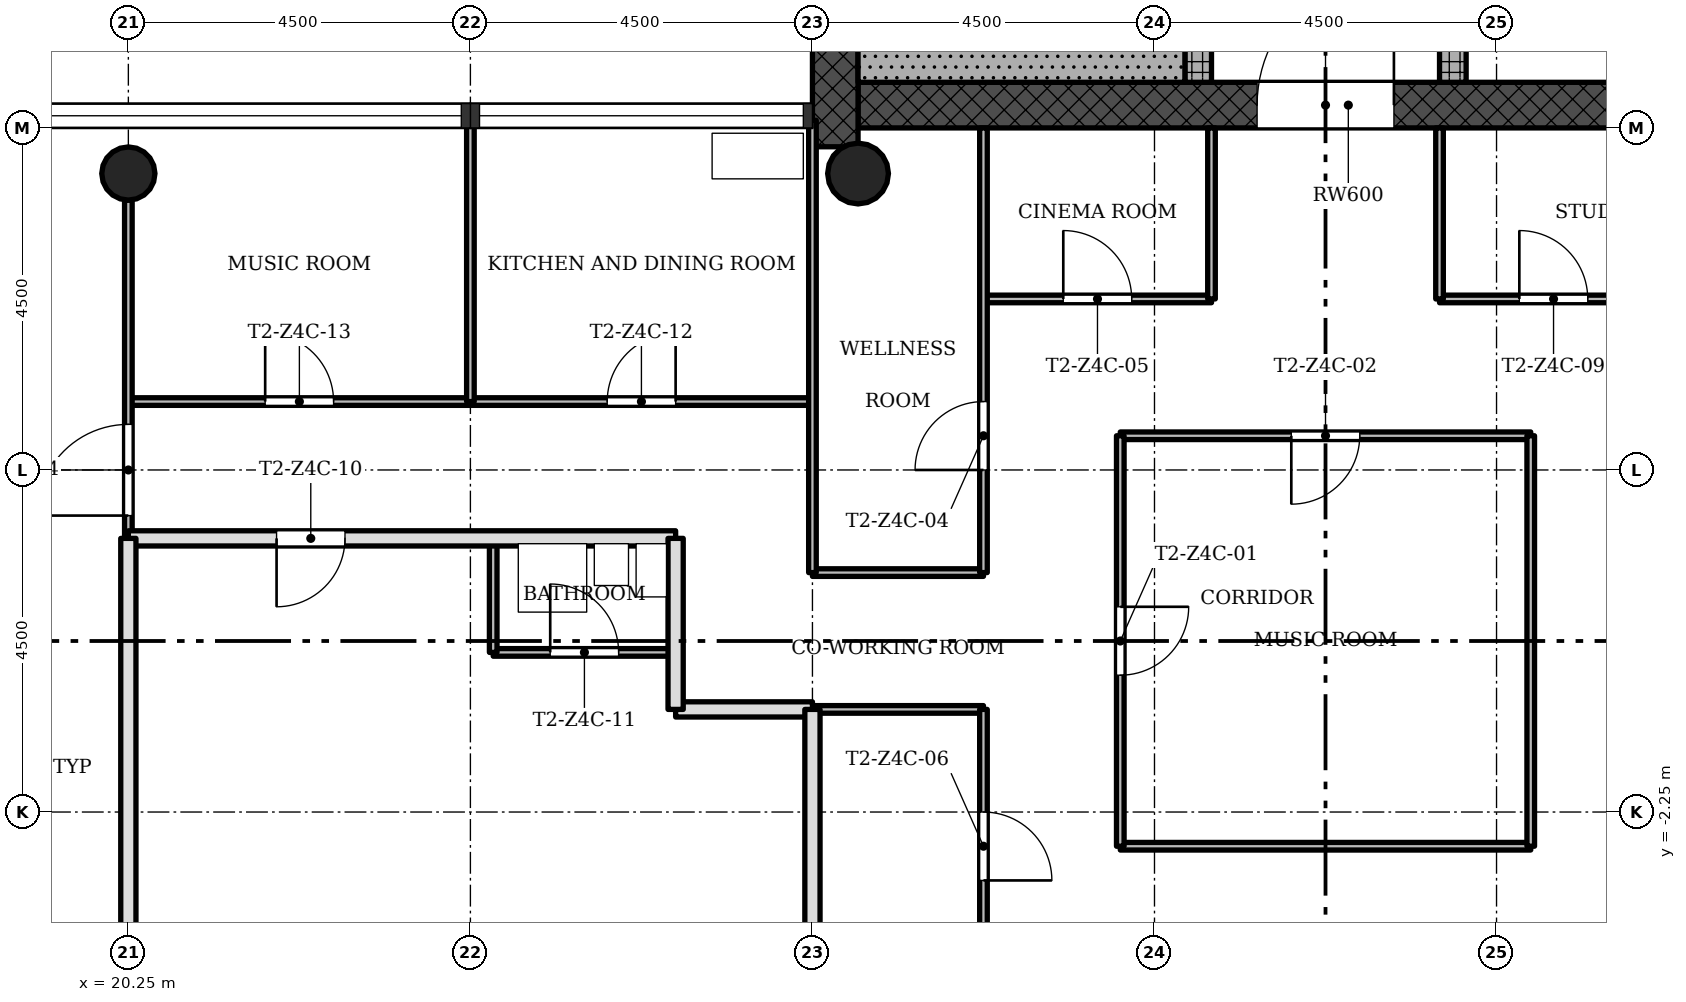
"""IFC4 building model, lengths in metres.
Left out: names, types, materials, properties, quantities, classifications, styles, units other than length and angle.
Written with IfcOpenShell. Run it as: python <this file> out.ifc"""

import sys

from ifc_helpers import new_model, si_unit, direction, frame, frame_2d, origin, origin_2d, place, context, subcontext, project, spatial, rectangle, hollow_circle, extrude, element, fill, save


model = new_model("IFC4")
c1 = context("Model", 3, precision=1e-05, world=origin(), true_north=direction((0.0, 1.0)))
c2 = subcontext(c1, "Body", "Model", "MODEL_VIEW")
j1 = project(units=[si_unit("LENGTHUNIT", "METRE"), si_unit("PLANEANGLEUNIT", "RADIAN")], contexts=[c1])
p1 = place(None, origin())
s1 = spatial("IfcSite", under=j1, at=p1, CompositionType="ELEMENT")
p2 = place(p1, origin())
s2 = spatial("IfcBuilding", under=s1, at=p2, CompositionType="ELEMENT")
p3 = place(p2, frame((0.0, 0.0, 189.2)))
s3 = spatial("IfcBuildingStorey", under=s2, at=p3, CompositionType="ELEMENT", Elevation=189.2)
p4 = place(p3, frame((29.85, 7.05, 0.0), z_axis=(0.0, 0.0, 1.0), x_axis=(1.0, 0.0, 0.0)))
e1 = element("IfcWall", 1, at=p4, inside=s3, PredefinedType="SHEAR", context=c2, shape_type="SweptSolid", body=[
    extrude(rectangle(XDim=12.9, YDim=0.6, at=frame_2d((6.45, 0.0))), origin(), (0.0, 0.0, 1.0), 3.4),
])
p5 = place(p4, frame((5.25, 0.0, 0.0)))
e2 = element("IfcOpeningElement", 2, at=p5, cuts=e1, PredefinedType="OPENING", context=c2, shape_type="SweptSolid", body=[
    extrude(rectangle(XDim=1.8, YDim=2.1, at=frame_2d((0.9, 1.05))), frame((0.0, 0.31, 0.0), z_axis=(0.0, -1.0, 0.0), x_axis=(1.0, 0.0, 0.0)), (0.0, 0.0, 1.0), 0.62),
])
p6 = place(p3, frame((29.55, 15.15, 0.0), z_axis=(0.0, 0.0, 1.0), x_axis=(0.0, -1.0, 0.0)))
e3 = element("IfcWall", 3, at=p6, inside=s3, PredefinedType="SHEAR", context=c2, shape_type="SweptSolid", body=[
    extrude(rectangle(XDim=8.648, YDim=0.6, at=frame_2d((4.324, 0.0))), origin(), (0.0, 0.0, 1.0), 3.4),
])
p7 = place(p3, frame((34.325, 7.35, 0.0), z_axis=(0.0, 0.0, 1.0), x_axis=(0.0, 1.0, 0.0)))
e4 = element("IfcWall", 4, at=p7, inside=s3, PredefinedType="SHEAR", context=c2, shape_type="SweptSolid", body=[
    extrude(rectangle(XDim=7.8, YDim=0.35, at=frame_2d((3.9, 0.0))), origin(), (0.0, 0.0, 1.0), 3.4),
])
p8 = place(p7, frame((1.05, 0.0, 0.0)))
e5 = element("IfcOpeningElement", 5, at=p8, cuts=e4, PredefinedType="OPENING", context=c2, shape_type="SweptSolid", body=[
    extrude(rectangle(XDim=0.9, YDim=2.1, at=frame_2d((0.45, 1.05))), frame((0.0, 0.185, 0.0), z_axis=(0.0, -1.0, 0.0), x_axis=(1.0, 0.0, 0.0)), (0.0, 0.0, 1.0), 0.37),
])
p9 = place(p3, frame((37.675, 7.35, 0.0), z_axis=(0.0, 0.0, 1.0), x_axis=(0.0, 1.0, 0.0)))
e6 = element("IfcWall", 6, at=p9, inside=s3, PredefinedType="SHEAR", context=c2, shape_type="SweptSolid", body=[
    extrude(rectangle(XDim=7.8, YDim=0.35, at=frame_2d((3.9, 0.0))), origin(), (0.0, 0.0, 1.0), 3.4),
])
p10 = place(p9, frame((1.15, 0.0, 0.0)))
e7 = element("IfcOpeningElement", 7, at=p10, cuts=e6, PredefinedType="OPENING", context=c2, shape_type="SweptSolid", body=[
    extrude(rectangle(XDim=1.1, YDim=2.1, at=frame_2d((0.55, 1.05))), frame((0.0, 0.185, 0.0), z_axis=(0.0, -1.0, 0.0), x_axis=(1.0, 0.0, 0.0)), (0.0, 0.0, 1.0), 0.37),
])
p11 = place(p9, frame((3.35, 0.0, 0.0)))
e8 = element("IfcOpeningElement", 8, at=p11, cuts=e6, PredefinedType="OPENING", context=c2, shape_type="SweptSolid", body=[
    extrude(rectangle(XDim=1.1, YDim=2.1, at=frame_2d((0.55, 1.05))), frame((0.0, 0.185, 0.0), z_axis=(0.0, -1.0, 0.0), x_axis=(1.0, 0.0, 0.0)), (0.0, 0.0, 1.0), 0.37),
])
p12 = place(p9, frame((5.55, 0.0, 0.0)))
e9 = element("IfcOpeningElement", 9, at=p12, cuts=e6, PredefinedType="OPENING", context=c2, shape_type="SweptSolid", body=[
    extrude(rectangle(XDim=1.1, YDim=2.1, at=frame_2d((0.55, 1.05))), frame((0.0, 0.185, 0.0), z_axis=(0.0, -1.0, 0.0), x_axis=(1.0, 0.0, 0.0)), (0.0, 0.0, 1.0), 0.37),
])
p13 = place(p3, frame((20.25, 6.15, 0.0), z_axis=(0.0, 0.0, 1.0), x_axis=(1.0, 0.0, 0.0)))
e10 = element("IfcColumn", 10, at=p13, inside=s3, PredefinedType="COLUMN", context=c2, shape_type="SweptSolid", body=[
    extrude(hollow_circle(Radius=0.35, WallThickness=0.025, at=origin_2d()), origin(), (0.0, 0.0, 1.0), 3.4),
])
p14 = place(p3, frame((29.85, 6.15, 0.0), z_axis=(0.0, 0.0, 1.0), x_axis=(1.0, 0.0, 0.0)))
e11 = element("IfcColumn", 11, at=p14, inside=s3, PredefinedType="COLUMN", context=c2, shape_type="SweptSolid", body=[
    extrude(hollow_circle(Radius=0.4, WallThickness=0.028, at=origin_2d()), origin(), (0.0, 0.0, 1.0), 3.4),
])
p15 = place(p3, frame((38.7, -2.7, 0.0), z_axis=(0.0, 0.0, 1.0), x_axis=(-1.0, 0.0, 0.0)))
e12 = element("IfcWall", 12, at=p15, inside=s3, PredefinedType="PARTITIONING", context=c2, shape_type="SweptSolid", body=[
    extrude(rectangle(XDim=5.4, YDim=0.1, at=frame_2d((2.7, 0.0))), origin(), (0.0, 0.0, 1.0), 3.0),
])
p16 = place(p3, frame((31.5, -0.9, 0.0), z_axis=(0.0, 0.0, 1.0), x_axis=(-1.0, 0.0, 0.0)))
e13 = element("IfcWall", 13, at=p16, inside=s3, PredefinedType="PARTITIONING", context=c2, shape_type="SweptSolid", body=[
    extrude(rectangle(XDim=2.25, YDim=0.1, at=frame_2d((1.125, 0.0))), origin(), (0.0, 0.0, 1.0), 3.0),
])
p17 = place(p3, frame((29.25, -0.9, 0.0), z_axis=(0.0, 0.0, 1.0), x_axis=(-1.0, 0.0, 0.0)))
e14 = element("IfcWall", 14, at=p17, inside=s3, PredefinedType="SOLIDWALL", context=c2, shape_type="SweptSolid", body=[
    extrude(rectangle(XDim=1.8, YDim=0.2, at=frame_2d((0.9, 0.0))), origin(), (0.0, 0.0, 1.0), 3.0),
])
p18 = place(p3, frame((27.45, -0.15, 0.0), z_axis=(0.0, 0.0, 1.0), x_axis=(-1.0, 0.0, 0.0)))
e15 = element("IfcWall", 15, at=p18, inside=s3, PredefinedType="PARTITIONING", context=c2, shape_type="SweptSolid", body=[
    extrude(rectangle(XDim=2.4, YDim=0.1, at=frame_2d((1.2, 0.0))), origin(), (0.0, 0.0, 1.0), 3.0),
])
p19 = place(p18, frame((0.75, 0.0, 0.0)))
e16 = element("IfcOpeningElement", 16, at=p19, cuts=e15, PredefinedType="OPENING", context=c2, shape_type="SweptSolid", body=[
    extrude(rectangle(XDim=0.9, YDim=2.1, at=frame_2d((0.45, 1.05))), frame((0.0, 0.06, 0.0), z_axis=(0.0, -1.0, 0.0), x_axis=(1.0, 0.0, 0.0)), (0.0, 0.0, 1.0), 0.12),
])
p20 = place(p3, frame((31.5, 0.9, 0.0), z_axis=(0.0, 0.0, 1.0), x_axis=(-1.0, 0.0, 0.0)))
e17 = element("IfcWall", 17, at=p20, inside=s3, PredefinedType="PARTITIONING", context=c2, shape_type="SweptSolid", body=[
    extrude(rectangle(XDim=2.25, YDim=0.1, at=frame_2d((1.125, 0.0))), origin(), (0.0, 0.0, 1.0), 3.0),
])
p21 = place(p3, frame((27.45, 1.35, 0.0), z_axis=(0.0, 0.0, 1.0), x_axis=(-1.0, 0.0, 0.0)))
e18 = element("IfcWall", 18, at=p21, inside=s3, PredefinedType="SOLIDWALL", context=c2, shape_type="SweptSolid", body=[
    extrude(rectangle(XDim=7.2, YDim=0.2, at=frame_2d((3.6, 0.0))), origin(), (0.0, 0.0, 1.0), 3.0),
])
p22 = place(p21, frame((4.35, 0.0, 0.0)))
e19 = element("IfcOpeningElement", 19, at=p22, cuts=e18, PredefinedType="OPENING", context=c2, shape_type="SweptSolid", body=[
    extrude(rectangle(XDim=0.9, YDim=2.1, at=frame_2d((0.45, 1.05))), frame((0.0, 0.11, 0.0), z_axis=(0.0, -1.0, 0.0), x_axis=(1.0, 0.0, 0.0)), (0.0, 0.0, 1.0), 0.22),
])
p23 = place(p3, frame((38.7, 2.7, 0.0), z_axis=(0.0, 0.0, 1.0), x_axis=(-1.0, 0.0, 0.0)))
e20 = element("IfcWall", 20, at=p23, inside=s3, PredefinedType="PARTITIONING", context=c2, shape_type="SweptSolid", body=[
    extrude(rectangle(XDim=5.4, YDim=0.1, at=frame_2d((2.7, 0.0))), origin(), (0.0, 0.0, 1.0), 3.0),
])
p24 = place(p23, frame((2.25, 0.0, 0.0)))
e21 = element("IfcOpeningElement", 21, at=p24, cuts=e20, PredefinedType="OPENING", context=c2, shape_type="SweptSolid", body=[
    extrude(rectangle(XDim=0.9, YDim=2.1, at=frame_2d((0.45, 1.05))), frame((0.0, 0.06, 0.0), z_axis=(0.0, -1.0, 0.0), x_axis=(1.0, 0.0, 0.0)), (0.0, 0.0, 1.0), 0.12),
])
p25 = place(p3, frame((29.25, 3.15, 0.0), z_axis=(0.0, 0.0, 1.0), x_axis=(-1.0, 0.0, 0.0)))
e22 = element("IfcWall", 22, at=p25, inside=s3, PredefinedType="PARTITIONING", context=c2, shape_type="SweptSolid", body=[
    extrude(rectangle(XDim=9.0, YDim=0.1, at=frame_2d((4.5, 0.0))), origin(), (0.0, 0.0, 1.0), 3.0),
])
p26 = place(p25, frame((1.8, 0.0, 0.0)))
e23 = element("IfcOpeningElement", 23, at=p26, cuts=e22, PredefinedType="OPENING", context=c2, shape_type="SweptSolid", body=[
    extrude(rectangle(XDim=0.9, YDim=2.1, at=frame_2d((0.45, 1.05))), frame((0.0, 0.06, 0.0), z_axis=(0.0, -1.0, 0.0), x_axis=(1.0, 0.0, 0.0)), (0.0, 0.0, 1.0), 0.12),
])
p27 = place(p25, frame((6.3, 0.0, 0.0)))
e24 = element("IfcOpeningElement", 24, at=p27, cuts=e22, PredefinedType="OPENING", context=c2, shape_type="SweptSolid", body=[
    extrude(rectangle(XDim=0.9, YDim=2.1, at=frame_2d((0.45, 1.05))), frame((0.0, 0.06, 0.0), z_axis=(0.0, -1.0, 0.0), x_axis=(1.0, 0.0, 0.0)), (0.0, 0.0, 1.0), 0.12),
])
p28 = place(p3, frame((42.75, 4.5, 0.0), z_axis=(0.0, 0.0, 1.0), x_axis=(-1.0, 0.0, 0.0)))
e25 = element("IfcWall", 25, at=p28, inside=s3, PredefinedType="PARTITIONING", context=c2, shape_type="SweptSolid", body=[
    extrude(rectangle(XDim=5.25, YDim=0.1, at=frame_2d((2.625, 0.0))), origin(), (0.0, 0.0, 1.0), 3.0),
])
p29 = place(p28, frame((3.3, 0.0, 0.0)))
e26 = element("IfcOpeningElement", 26, at=p29, cuts=e25, PredefinedType="OPENING", context=c2, shape_type="SweptSolid", body=[
    extrude(rectangle(XDim=0.9, YDim=2.1, at=frame_2d((0.45, 1.05))), frame((0.0, 0.06, 0.0), z_axis=(0.0, -1.0, 0.0), x_axis=(1.0, 0.0, 0.0)), (0.0, 0.0, 1.0), 0.12),
])
p30 = place(p3, frame((34.5, 4.5, 0.0), z_axis=(0.0, 0.0, 1.0), x_axis=(-1.0, 0.0, 0.0)))
e27 = element("IfcWall", 27, at=p30, inside=s3, PredefinedType="PARTITIONING", context=c2, shape_type="SweptSolid", body=[
    extrude(rectangle(XDim=3.0, YDim=0.1, at=frame_2d((1.5, 0.0))), origin(), (0.0, 0.0, 1.0), 3.0),
])
p31 = place(p30, frame((1.05, 0.0, 0.0)))
e28 = element("IfcOpeningElement", 28, at=p31, cuts=e27, PredefinedType="OPENING", context=c2, shape_type="SweptSolid", body=[
    extrude(rectangle(XDim=0.9, YDim=2.1, at=frame_2d((0.45, 1.05))), frame((0.0, 0.06, 0.0), z_axis=(0.0, -1.0, 0.0), x_axis=(1.0, 0.0, 0.0)), (0.0, 0.0, 1.0), 0.12),
])
p32 = place(p3, frame((38.7, -2.7, 0.0), z_axis=(0.0, 0.0, 1.0), x_axis=(0.0, 1.0, 0.0)))
e29 = element("IfcWall", 29, at=p32, inside=s3, PredefinedType="PARTITIONING", context=c2, shape_type="SweptSolid", body=[
    extrude(rectangle(XDim=5.4, YDim=0.1, at=frame_2d((2.7, 0.0))), origin(), (0.0, 0.0, 1.0), 3.0),
])
for number, where, z_axis, x_axis in (
    (30, (37.5, 4.5, 0.0), (0.0, 0.0, 1.0), (0.0, 1.0, 0.0)),
    (31, (34.5, 4.5, 0.0), (0.0, 0.0, 1.0), (0.0, 1.0, 0.0)),
):
    element("IfcWall", number, at=place(p3, frame(where, z_axis=z_axis, x_axis=x_axis)), inside=s3, PredefinedType="PARTITIONING", context=c2, shape_type="SweptSolid", body=[
        extrude(rectangle(XDim=2.25, YDim=0.1, at=frame_2d((1.125, 0.0))), origin(), (0.0, 0.0, 1.0), 3.0),
    ])
p33 = place(p3, frame((33.3, -2.7, 0.0), z_axis=(0.0, 0.0, 1.0), x_axis=(0.0, 1.0, 0.0)))
e32 = element("IfcWall", 32, at=p33, inside=s3, PredefinedType="PARTITIONING", context=c2, shape_type="SweptSolid", body=[
    extrude(rectangle(XDim=5.4, YDim=0.1, at=frame_2d((2.7, 0.0))), origin(), (0.0, 0.0, 1.0), 3.0),
])
p34 = place(p33, frame((2.25, 0.0, 0.0)))
e33 = element("IfcOpeningElement", 33, at=p34, cuts=e32, PredefinedType="OPENING", context=c2, shape_type="SweptSolid", body=[
    extrude(rectangle(XDim=0.9, YDim=2.1, at=frame_2d((0.45, 1.05))), frame((0.0, 0.06, 0.0), z_axis=(0.0, -1.0, 0.0), x_axis=(1.0, 0.0, 0.0)), (0.0, 0.0, 1.0), 0.12),
])
p35 = place(p3, frame((31.5, -4.5, 0.0), z_axis=(0.0, 0.0, 1.0), x_axis=(0.0, 1.0, 0.0)))
e34 = element("IfcWall", 34, at=p35, inside=s3, PredefinedType="PARTITIONING", context=c2, shape_type="SweptSolid", body=[
    extrude(rectangle(XDim=3.6, YDim=0.1, at=frame_2d((1.8, 0.0))), origin(), (0.0, 0.0, 1.0), 3.0),
])
p36 = place(p35, frame((1.35, 0.0, 0.0)))
e35 = element("IfcOpeningElement", 35, at=p36, cuts=e34, PredefinedType="OPENING", context=c2, shape_type="SweptSolid", body=[
    extrude(rectangle(XDim=0.9, YDim=2.1, at=frame_2d((0.45, 1.05))), frame((0.0, 0.06, 0.0), z_axis=(0.0, -1.0, 0.0), x_axis=(1.0, 0.0, 0.0)), (0.0, 0.0, 1.0), 0.12),
])
p37 = place(p3, frame((31.5, 0.9, 0.0), z_axis=(0.0, 0.0, 1.0), x_axis=(0.0, 1.0, 0.0)))
e36 = element("IfcWall", 36, at=p37, inside=s3, PredefinedType="PARTITIONING", context=c2, shape_type="SweptSolid", body=[
    extrude(rectangle(XDim=5.85, YDim=0.1, at=frame_2d((2.925, 0.0))), origin(), (0.0, 0.0, 1.0), 3.0),
])
p38 = place(p37, frame((1.35, 0.0, 0.0)))
e37 = element("IfcOpeningElement", 37, at=p38, cuts=e36, PredefinedType="OPENING", context=c2, shape_type="SweptSolid", body=[
    extrude(rectangle(XDim=0.9, YDim=2.1, at=frame_2d((0.45, 1.05))), frame((0.0, 0.06, 0.0), z_axis=(0.0, -1.0, 0.0), x_axis=(1.0, 0.0, 0.0)), (0.0, 0.0, 1.0), 0.12),
])
p39 = place(p3, frame((29.25, 0.9, 0.0), z_axis=(0.0, 0.0, 1.0), x_axis=(0.0, 1.0, 0.0)))
e38 = element("IfcWall", 38, at=p39, inside=s3, PredefinedType="PARTITIONING", context=c2, shape_type="SweptSolid", body=[
    extrude(rectangle(XDim=5.95, YDim=0.1, at=frame_2d((2.975, 0.0))), origin(), (0.0, 0.0, 1.0), 3.0),
])
p40 = place(p3, frame((29.25, -6.85, 0.0), z_axis=(0.0, 0.0, 1.0), x_axis=(0.0, 1.0, 0.0)))
e39 = element("IfcWall", 39, at=p40, inside=s3, PredefinedType="SOLIDWALL", context=c2, shape_type="SweptSolid", body=[
    extrude(rectangle(XDim=5.95, YDim=0.2, at=frame_2d((2.975, 0.0))), origin(), (0.0, 0.0, 1.0), 3.0),
])
p41 = place(p3, frame((27.45, -0.9, 0.0), z_axis=(0.0, 0.0, 1.0), x_axis=(0.0, 1.0, 0.0)))
e40 = element("IfcWall", 40, at=p41, inside=s3, PredefinedType="SOLIDWALL", context=c2, shape_type="SweptSolid", body=[
    extrude(rectangle(XDim=2.25, YDim=0.2, at=frame_2d((1.125, 0.0))), origin(), (0.0, 0.0, 1.0), 3.0),
])
p42 = place(p3, frame((25.05, -0.15, 0.0), z_axis=(0.0, 0.0, 1.0), x_axis=(0.0, 1.0, 0.0)))
e41 = element("IfcWall", 41, at=p42, inside=s3, PredefinedType="PARTITIONING", context=c2, shape_type="SweptSolid", body=[
    extrude(rectangle(XDim=1.5, YDim=0.1, at=frame_2d((0.75, 0.0))), origin(), (0.0, 0.0, 1.0), 3.0),
])
p43 = place(p3, frame((24.75, 3.15, 0.0), z_axis=(0.0, 0.0, 1.0), x_axis=(0.0, 1.0, 0.0)))
e42 = element("IfcWall", 42, at=p43, inside=s3, PredefinedType="PARTITIONING", context=c2, shape_type="SweptSolid", body=[
    extrude(rectangle(XDim=3.7, YDim=0.1, at=frame_2d((1.85, 0.0))), origin(), (0.0, 0.0, 1.0), 3.0),
])
p44 = place(p3, frame((20.25, 1.35, 0.0), z_axis=(0.0, 0.0, 1.0), x_axis=(0.0, 1.0, 0.0)))
e43 = element("IfcWall", 43, at=p44, inside=s3, PredefinedType="PARTITIONING", context=c2, shape_type="SweptSolid", body=[
    extrude(rectangle(XDim=4.45, YDim=0.1, at=frame_2d((2.225, 0.0))), origin(), (0.0, 0.0, 1.0), 3.0),
])
p45 = place(p44, frame((0.3, 0.0, 0.0)))
e44 = element("IfcOpeningElement", 44, at=p45, cuts=e43, PredefinedType="OPENING", context=c2, shape_type="SweptSolid", body=[
    extrude(rectangle(XDim=1.2, YDim=2.1, at=frame_2d((0.6, 1.05))), frame((0.0, 0.06, 0.0), z_axis=(0.0, -1.0, 0.0), x_axis=(1.0, 0.0, 0.0)), (0.0, 0.0, 1.0), 0.12),
])
p46 = place(p3, frame((20.25, -5.8, 0.0), z_axis=(0.0, 0.0, 1.0), x_axis=(0.0, 1.0, 0.0)))
e45 = element("IfcWall", 45, at=p46, inside=s3, PredefinedType="SOLIDWALL", context=c2, shape_type="SweptSolid", body=[
    extrude(rectangle(XDim=7.15, YDim=0.2, at=frame_2d((3.575, 0.0))), origin(), (0.0, 0.0, 1.0), 3.0),
])
p47 = place(p3, frame((34.15, 7.65, 0.0), z_axis=(0.0, 0.0, 1.0), x_axis=(-1.0, 0.0, 0.0)))
e46 = element("IfcWall", 46, at=p47, inside=s3, PredefinedType="SHEAR", context=c2, shape_type="SweptSolid", body=[
    extrude(rectangle(XDim=4.3, YDim=0.6, at=frame_2d((2.15, 0.0))), origin(), (0.0, 0.0, 1.0), 3.4),
])
p48 = place(p34, origin())
e47 = element("IfcDoor", 47, at=p48, inside=s3, OperationType="SINGLE_SWING_RIGHT", PredefinedType="DOOR", context=c2, shape_type="SweptSolid", body=[
    extrude(rectangle(XDim=0.9, YDim=2.1, at=frame_2d((0.45, 1.05))), frame((0.0, 0.025, 0.0), z_axis=(0.0, -1.0, 0.0), x_axis=(1.0, 0.0, 0.0)), (0.0, 0.0, 1.0), 0.05),
])
fill(e33, e47)
p49 = place(p24, origin())
e48 = element("IfcDoor", 48, at=p49, inside=s3, OperationType="SINGLE_SWING_LEFT", PredefinedType="DOOR", context=c2, shape_type="SweptSolid", body=[
    extrude(rectangle(XDim=0.9, YDim=2.1, at=frame_2d((0.45, 1.05))), frame((0.0, 0.025, 0.0), z_axis=(0.0, -1.0, 0.0), x_axis=(1.0, 0.0, 0.0)), (0.0, 0.0, 1.0), 0.05),
])
fill(e21, e48)
p50 = place(p38, origin())
e49 = element("IfcDoor", 49, at=p50, inside=s3, OperationType="SINGLE_SWING_RIGHT", PredefinedType="DOOR", context=c2, shape_type="SweptSolid", body=[
    extrude(rectangle(XDim=0.9, YDim=2.1, at=frame_2d((0.45, 1.05))), frame((0.0, 0.025, 0.0), z_axis=(0.0, -1.0, 0.0), x_axis=(1.0, 0.0, 0.0)), (0.0, 0.0, 1.0), 0.05),
])
fill(e37, e49)
p51 = place(p31, origin())
e50 = element("IfcDoor", 50, at=p51, inside=s3, OperationType="SINGLE_SWING_RIGHT", PredefinedType="DOOR", context=c2, shape_type="SweptSolid", body=[
    extrude(rectangle(XDim=0.9, YDim=2.1, at=frame_2d((0.45, 1.05))), frame((0.0, 0.025, 0.0), z_axis=(0.0, -1.0, 0.0), x_axis=(1.0, 0.0, 0.0)), (0.0, 0.0, 1.0), 0.05),
])
fill(e28, e50)
p52 = place(p36, origin())
e51 = element("IfcDoor", 51, at=p52, inside=s3, OperationType="SINGLE_SWING_LEFT", PredefinedType="DOOR", context=c2, shape_type="SweptSolid", body=[
    extrude(rectangle(XDim=0.9, YDim=2.1, at=frame_2d((0.45, 1.05))), frame((0.0, 0.025, 0.0), z_axis=(0.0, -1.0, 0.0), x_axis=(1.0, 0.0, 0.0)), (0.0, 0.0, 1.0), 0.05),
])
fill(e35, e51)
p53 = place(p29, origin())
e52 = element("IfcDoor", 52, at=p53, inside=s3, OperationType="SINGLE_SWING_RIGHT", PredefinedType="DOOR", context=c2, shape_type="SweptSolid", body=[
    extrude(rectangle(XDim=0.9, YDim=2.1, at=frame_2d((0.45, 1.05))), frame((0.0, 0.025, 0.0), z_axis=(0.0, -1.0, 0.0), x_axis=(1.0, 0.0, 0.0)), (0.0, 0.0, 1.0), 0.05),
])
fill(e26, e52)
p54 = place(p22, origin())
e53 = element("IfcDoor", 53, at=p54, inside=s3, OperationType="SINGLE_SWING_LEFT", PredefinedType="DOOR", context=c2, shape_type="SweptSolid", body=[
    extrude(rectangle(XDim=0.9, YDim=2.1, at=frame_2d((0.45, 1.05))), frame((0.0, 0.025, 0.0), z_axis=(0.0, -1.0, 0.0), x_axis=(1.0, 0.0, 0.0)), (0.0, 0.0, 1.0), 0.05),
])
fill(e19, e53)
p55 = place(p19, origin())
e54 = element("IfcDoor", 54, at=p55, inside=s3, OperationType="SINGLE_SWING_RIGHT", PredefinedType="DOOR", context=c2, shape_type="SweptSolid", body=[
    extrude(rectangle(XDim=0.9, YDim=2.1, at=frame_2d((0.45, 1.05))), frame((0.0, 0.025, 0.0), z_axis=(0.0, -1.0, 0.0), x_axis=(1.0, 0.0, 0.0)), (0.0, 0.0, 1.0), 0.05),
])
fill(e16, e54)
p56 = place(p26, origin())
e55 = element("IfcDoor", 55, at=p56, inside=s3, OperationType="SINGLE_SWING_LEFT", PredefinedType="DOOR", context=c2, shape_type="SweptSolid", body=[
    extrude(rectangle(XDim=0.9, YDim=2.1, at=frame_2d((0.45, 1.05))), frame((0.0, 0.025, 0.0), z_axis=(0.0, -1.0, 0.0), x_axis=(1.0, 0.0, 0.0)), (0.0, 0.0, 1.0), 0.05),
])
fill(e23, e55)
p57 = place(p27, origin())
e56 = element("IfcDoor", 56, at=p57, inside=s3, OperationType="SINGLE_SWING_RIGHT", PredefinedType="DOOR", context=c2, shape_type="SweptSolid", body=[
    extrude(rectangle(XDim=0.9, YDim=2.1, at=frame_2d((0.45, 1.05))), frame((0.0, 0.025, 0.0), z_axis=(0.0, -1.0, 0.0), x_axis=(1.0, 0.0, 0.0)), (0.0, 0.0, 1.0), 0.05),
])
fill(e24, e56)
p58 = place(p45, origin())
e57 = element("IfcDoor", 57, at=p58, inside=s3, OperationType="SINGLE_SWING_RIGHT", PredefinedType="DOOR", context=c2, shape_type="SweptSolid", body=[
    extrude(rectangle(XDim=1.2, YDim=2.1, at=frame_2d((0.6, 1.05))), frame((0.0, 0.025, 0.0), z_axis=(0.0, -1.0, 0.0), x_axis=(1.0, 0.0, 0.0)), (0.0, 0.0, 1.0), 0.05),
])
fill(e44, e57)
p59 = place(p5, origin())
e58 = element("IfcDoor", 58, at=p59, inside=s3, OperationType="SINGLE_SWING_LEFT", PredefinedType="DOOR", context=c2, shape_type="SweptSolid", body=[
    extrude(rectangle(XDim=1.8, YDim=2.1, at=frame_2d((0.9, 1.05))), frame((0.0, 0.025, 0.0), z_axis=(0.0, -1.0, 0.0), x_axis=(1.0, 0.0, 0.0)), (0.0, 0.0, 1.0), 0.05),
])
fill(e2, e58)
save(model, sys.argv[1])
